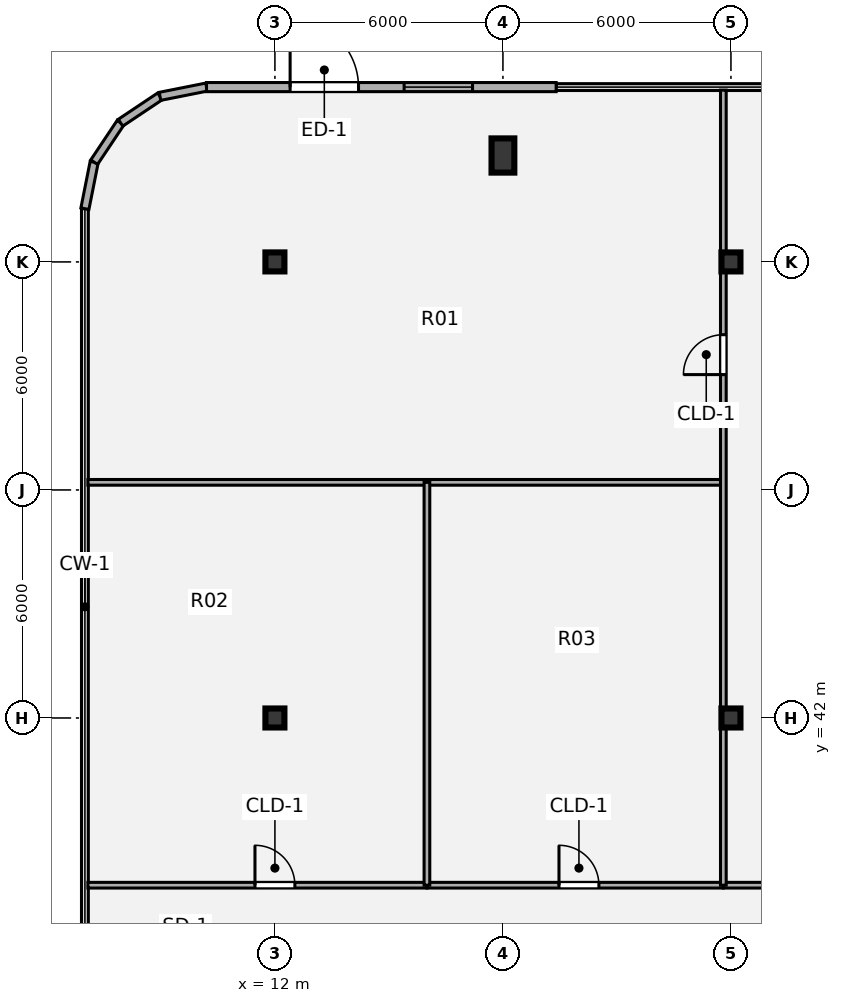
"""IFC4 building model, lengths in metres.
Left out: names, types, materials, properties, quantities, classifications, styles, units other than length and angle.
Written with IfcOpenShell. Run it as: python <this file> out.ifc"""

import sys

from ifc_helpers import new_model, si_unit, direction, frame, frame_2d, origin, origin_2d, place, context, subcontext, project, spatial, rectangle, i_section, extrude, source, transform, mapped, element, fill, save


model = new_model("IFC4")
c1 = context("Model", 3, precision=1e-05, world=origin(), true_north=direction((0.0, 1.0)))
c2 = subcontext(c1, "Body", "Model", "MODEL_VIEW")
j1 = project(units=[si_unit("LENGTHUNIT", "METRE"), si_unit("PLANEANGLEUNIT", "RADIAN")], contexts=[c1])
p1 = place(None, origin())
s1 = spatial("IfcSite", under=j1, at=p1, CompositionType="ELEMENT")
p2 = place(p1, origin())
s2 = spatial("IfcBuilding", under=s1, at=p2, CompositionType="ELEMENT")
p3 = place(p2, origin())
s3 = spatial("IfcBuildingStorey", under=s2, at=p3, CompositionType="ELEMENT", Elevation=0.0)
m1 = source(origin(), c2, "Body", "SweptSolid", [
    extrude(i_section(OverallWidth=0.5, OverallDepth=0.5, WebThickness=0.028, FlangeThickness=0.045, at=origin_2d()), origin(), (0.0, 0.0, 1.0), 5.4),
])
for number, where, z_axis, x_axis in (
    (1, (12.0, 42.0, 0.0), (0.0, 0.0, 1.0), (1.0, 0.0, 0.0)),
    (2, (24.0, 42.0, 0.0), (0.0, 0.0, 1.0), (1.0, 0.0, 0.0)),
    (3, (12.0, 54.0, 0.0), (0.0, 0.0, 1.0), (1.0, 0.0, 0.0)),
    (4, (24.0, 54.0, 0.0), (0.0, 0.0, 1.0), (1.0, 0.0, 0.0)),
):
    element("IfcColumn", number, at=place(p3, frame(where, z_axis=z_axis, x_axis=x_axis)), inside=s3, PredefinedType="COLUMN", context=c2, shape_type="MappedRepresentation", body=[
        mapped(m1, transform((0.0, 0.0, 0.0), x_axis=(1.0, 0.0, 0.0), y_axis=(0.0, 1.0, 0.0), z_axis=(0.0, 0.0, 1.0), scale=1.0)),
    ])
m2 = source(origin(), c2, "Body", "SweptSolid", [
    extrude(rectangle(XDim=0.6, YDim=0.9, at=origin_2d()), origin(), (0.0, 0.0, 1.0), 5.4),
])
p4 = place(p3, frame((18.0, 56.8, 0.0), z_axis=(0.0, 0.0, 1.0), x_axis=(1.0, 0.0, 0.0)))
e5 = element("IfcColumn", 5, at=p4, inside=s3, PredefinedType="PILASTER", context=c2, shape_type="MappedRepresentation", body=[
    mapped(m2, transform((0.0, 0.0, 0.0), x_axis=(1.0, 0.0, 0.0), y_axis=(0.0, 1.0, 0.0), z_axis=(0.0, 0.0, 1.0), scale=1.0)),
])
for number, where, z_axis, x_axis in (
    (6, (7.0, 55.4, 0.0), (0.0, 0.0, 1.0), (0.195, 0.981, 0.0)),
    (7, (7.244, 56.625, 0.0), (0.0, 0.0, 1.0), (0.556, 0.831, 0.0)),
    (8, (7.937, 57.663, 0.0), (0.0, 0.0, 1.0), (0.831, 0.556, 0.0)),
    (9, (8.975, 58.356, 0.0), (0.0, 0.0, 1.0), (0.981, 0.195, 0.0)),
):
    element("IfcWall", number, at=place(p3, frame(where, z_axis=z_axis, x_axis=x_axis)), inside=s3, PredefinedType="SOLIDWALL", context=c2, shape_type="SweptSolid", body=[
        extrude(rectangle(XDim=1.249, YDim=0.215, at=frame_2d((0.624, 0.0))), origin(), (0.0, 0.0, 1.0), 5.12),
    ])
p5 = place(p3, frame((10.2, 58.6, 0.0), z_axis=(0.0, 0.0, 1.0), x_axis=(1.0, 0.0, 0.0)))
e10 = element("IfcWall", 10, at=p5, inside=s3, PredefinedType="SOLIDWALL", context=c2, shape_type="SweptSolid", body=[
    extrude(rectangle(XDim=9.2, YDim=0.24, at=frame_2d((4.6, 0.0))), origin(), (0.0, 0.0, 1.0), 5.12),
])
p6 = place(p5, frame((2.2, 0.0, 0.0)))
e11 = element("IfcOpeningElement", 11, at=p6, cuts=e10, PredefinedType="OPENING", context=c2, shape_type="SweptSolid", body=[
    extrude(rectangle(XDim=1.8, YDim=2.3, at=origin_2d()), frame((0.9, 0.13, 1.15), z_axis=(0.0, -1.0, 0.0), x_axis=(1.0, 0.0, 0.0)), (0.0, 0.0, 1.0), 0.26),
])
p7 = place(p5, frame((5.2, 0.0, 0.9)))
e12 = element("IfcOpeningElement", 12, at=p7, cuts=e10, PredefinedType="OPENING", context=c2, shape_type="SweptSolid", body=[
    extrude(rectangle(XDim=1.8, YDim=1.5, at=origin_2d()), frame((0.9, 0.13, 0.75), z_axis=(0.0, -1.0, 0.0), x_axis=(1.0, 0.0, 0.0)), (0.0, 0.0, 1.0), 0.26),
])
p8 = place(p3, frame((7.08, 37.6, 0.0), z_axis=(0.0, 0.0, 1.0), x_axis=(1.0, 0.0, 0.0)))
e13 = element("IfcWall", 13, at=p8, inside=s3, PredefinedType="PARTITIONING", context=c2, shape_type="SweptSolid", body=[
    extrude(rectangle(XDim=8.92, YDim=0.15, at=frame_2d((4.46, 0.0))), origin(), (0.0, 0.0, 1.0), 5.09),
])
p9 = place(p8, frame((4.395, 0.0, 0.0)))
e14 = element("IfcOpeningElement", 14, at=p9, cuts=e13, PredefinedType="OPENING", context=c2, shape_type="SweptSolid", body=[
    extrude(rectangle(XDim=1.05, YDim=2.1, at=origin_2d()), frame((0.525, 0.085, 1.05), z_axis=(0.0, -1.0, 0.0), x_axis=(1.0, 0.0, 0.0)), (0.0, 0.0, 1.0), 0.17),
])
p10 = place(p3, frame((16.0, 37.6, 0.0), z_axis=(0.0, 0.0, 1.0), x_axis=(1.0, 0.0, 0.0)))
e15 = element("IfcWall", 15, at=p10, inside=s3, PredefinedType="PARTITIONING", context=c2, shape_type="SweptSolid", body=[
    extrude(rectangle(XDim=7.8, YDim=0.15, at=frame_2d((3.9, 0.0))), origin(), (0.0, 0.0, 1.0), 5.09),
])
p11 = place(p10, frame((3.475, 0.0, 0.0)))
e16 = element("IfcOpeningElement", 16, at=p11, cuts=e15, PredefinedType="OPENING", context=c2, shape_type="SweptSolid", body=[
    extrude(rectangle(XDim=1.05, YDim=2.1, at=origin_2d()), frame((0.525, 0.085, 1.05), z_axis=(0.0, -1.0, 0.0), x_axis=(1.0, 0.0, 0.0)), (0.0, 0.0, 1.0), 0.17),
])
p12 = place(p3, frame((23.8, 37.6, 0.0), z_axis=(0.0, 0.0, 1.0), x_axis=(1.0, 0.0, 0.0)))
e17 = element("IfcWall", 17, at=p12, inside=s3, PredefinedType="PARTITIONING", context=c2, shape_type="SweptSolid", body=[
    extrude(rectangle(XDim=10.8, YDim=0.15, at=frame_2d((5.4, 0.0))), origin(), (0.0, 0.0, 1.0), 5.09),
])
p13 = place(p3, frame((7.08, 48.2, 0.0), z_axis=(0.0, 0.0, 1.0), x_axis=(1.0, 0.0, 0.0)))
e18 = element("IfcWall", 18, at=p13, inside=s3, PredefinedType="PARTITIONING", context=c2, shape_type="SweptSolid", body=[
    extrude(rectangle(XDim=16.72, YDim=0.15, at=frame_2d((8.36, 0.0))), origin(), (0.0, 0.0, 1.0), 5.09),
])
p14 = place(p3, frame((16.0, 37.6, 0.0), z_axis=(0.0, 0.0, 1.0), x_axis=(0.0, 1.0, 0.0)))
e19 = element("IfcWall", 19, at=p14, inside=s3, PredefinedType="PARTITIONING", context=c2, shape_type="SweptSolid", body=[
    extrude(rectangle(XDim=10.6, YDim=0.15, at=frame_2d((5.3, 0.0))), origin(), (0.0, 0.0, 1.0), 4.746),
])
p15 = place(p3, frame((23.8, 37.6, 0.0), z_axis=(0.0, 0.0, 1.0), x_axis=(0.0, 1.0, 0.0)))
e20 = element("IfcWall", 20, at=p15, inside=s3, PredefinedType="PARTITIONING", context=c2, shape_type="SweptSolid", body=[
    extrude(rectangle(XDim=20.92, YDim=0.15, at=frame_2d((10.46, 0.0))), origin(), (0.0, 0.0, 1.0), 4.305),
])
p16 = place(p15, frame((13.435, 0.0, 0.0)))
e21 = element("IfcOpeningElement", 21, at=p16, cuts=e20, PredefinedType="OPENING", context=c2, shape_type="SweptSolid", body=[
    extrude(rectangle(XDim=1.05, YDim=2.1, at=origin_2d()), frame((0.525, 0.085, 1.05), z_axis=(0.0, -1.0, 0.0), x_axis=(1.0, 0.0, 0.0)), (0.0, 0.0, 1.0), 0.17),
])
m3 = source(origin(), c2, "Body", "SweptSolid", [
    extrude(rectangle(XDim=1.8, YDim=2.3, at=origin_2d()), frame((0.9, 0.025, 1.15), z_axis=(0.0, -1.0, 0.0), x_axis=(1.0, 0.0, 0.0)), (0.0, 0.0, 1.0), 0.05),
])
p17 = place(p6, origin())
e22 = element("IfcDoor", 22, at=p17, inside=s3, OperationType="SINGLE_SWING_LEFT", PredefinedType="DOOR", context=c2, shape_type="MappedRepresentation", body=[
    mapped(m3, transform((0.0, 0.0, 0.0), x_axis=(1.0, 0.0, 0.0), y_axis=(0.0, 1.0, 0.0), z_axis=(0.0, 0.0, 1.0), scale=1.0)),
])
fill(e11, e22)
m4 = source(origin(), c2, "Body", "SweptSolid", [
    extrude(rectangle(XDim=1.8, YDim=1.5, at=origin_2d()), frame((0.9, 0.03, 0.75), z_axis=(0.0, -1.0, 0.0), x_axis=(1.0, 0.0, 0.0)), (0.0, 0.0, 1.0), 0.06),
])
p18 = place(p7, origin())
e23 = element("IfcWindow", 23, at=p18, inside=s3, PartitioningType="SINGLE_PANEL", PredefinedType="WINDOW", context=c2, shape_type="MappedRepresentation", body=[
    mapped(m4, transform((0.0, 0.0, 0.0), x_axis=(1.0, 0.0, 0.0), y_axis=(0.0, 1.0, 0.0), z_axis=(0.0, 0.0, 1.0), scale=1.0)),
])
fill(e12, e23)
m5 = source(origin(), c2, "Body", "SweptSolid", [
    extrude(rectangle(XDim=1.05, YDim=2.1, at=origin_2d()), frame((0.525, 0.025, 1.05), z_axis=(0.0, -1.0, 0.0), x_axis=(1.0, 0.0, 0.0)), (0.0, 0.0, 1.0), 0.05),
])
p19 = place(p9, origin())
e24 = element("IfcDoor", 24, at=p19, inside=s3, OperationType="SINGLE_SWING_LEFT", PredefinedType="DOOR", context=c2, shape_type="MappedRepresentation", body=[
    mapped(m5, transform((0.0, 0.0, 0.0), x_axis=(1.0, 0.0, 0.0), y_axis=(0.0, 1.0, 0.0), z_axis=(0.0, 0.0, 1.0), scale=1.0)),
])
fill(e14, e24)
p20 = place(p11, origin())
e25 = element("IfcDoor", 25, at=p20, inside=s3, OperationType="SINGLE_SWING_LEFT", PredefinedType="DOOR", context=c2, shape_type="MappedRepresentation", body=[
    mapped(m5, transform((0.0, 0.0, 0.0), x_axis=(1.0, 0.0, 0.0), y_axis=(0.0, 1.0, 0.0), z_axis=(0.0, 0.0, 1.0), scale=1.0)),
])
fill(e16, e25)
p21 = place(p16, origin())
e26 = element("IfcDoor", 26, at=p21, inside=s3, OperationType="SINGLE_SWING_LEFT", PredefinedType="DOOR", context=c2, shape_type="MappedRepresentation", body=[
    mapped(m5, transform((0.0, 0.0, 0.0), x_axis=(1.0, 0.0, 0.0), y_axis=(0.0, 1.0, 0.0), z_axis=(0.0, 0.0, 1.0), scale=1.0)),
])
fill(e21, e26)
save(model, sys.argv[1])
